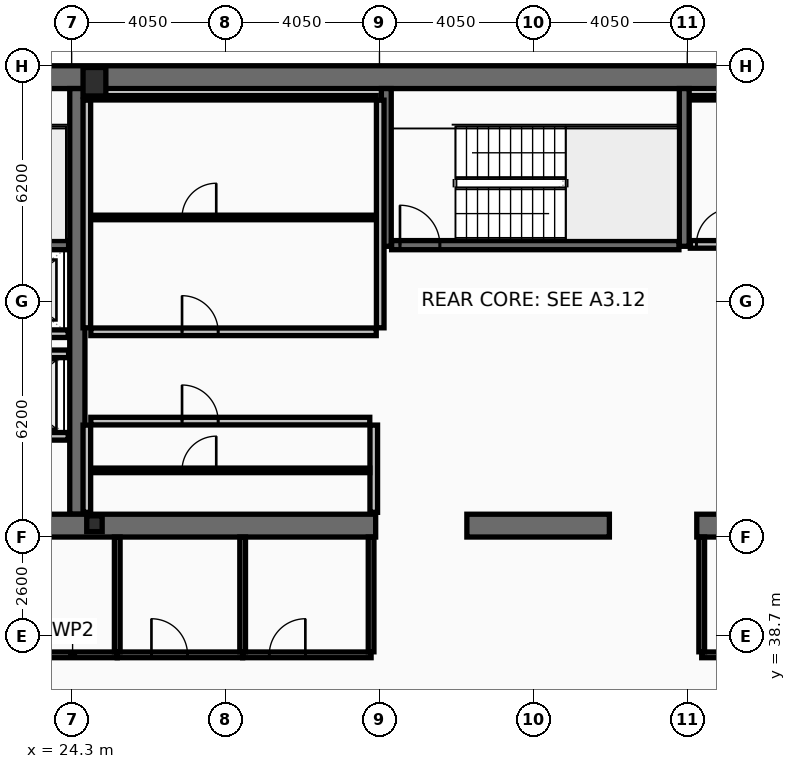
"""IFC4 building model, lengths in metres.
Left out: names, types, materials, properties, quantities, classifications, styles, units other than length and angle.
Written with IfcOpenShell. Run it as: python <this file> out.ifc"""

import sys

from ifc_helpers import new_model, si_unit, direction, frame, frame_2d, origin, origin_2d, place, context, subcontext, project, spatial, rectangle, hollow_rectangle, i_section, extrude, element, fill, save


model = new_model("IFC4")
c1 = context("Model", 3, precision=1e-05, world=origin(), true_north=direction((0.0, 1.0)))
c2 = subcontext(c1, "Body", "Model", "MODEL_VIEW")
j1 = project(units=[si_unit("LENGTHUNIT", "METRE"), si_unit("PLANEANGLEUNIT", "RADIAN")], contexts=[c1])
p1 = place(None, origin())
s1 = spatial("IfcSite", under=j1, at=p1, CompositionType="ELEMENT")
p2 = place(p1, origin())
s2 = spatial("IfcBuilding", under=s1, at=p2, CompositionType="ELEMENT")
p3 = place(p2, frame((0.0, 0.0, 246.2)))
s3 = spatial("IfcBuildingStorey", under=s2, at=p3, CompositionType="ELEMENT", Elevation=246.2)
p4 = place(p3, frame((16.2, 53.4, 0.0), z_axis=(0.0, 0.0, 1.0), x_axis=(1.0, 0.0, 0.0)))
e1 = element("IfcWall", 1, at=p4, inside=s3, PredefinedType="SHEAR", context=c2, shape_type="SweptSolid", body=[
    extrude(rectangle(XDim=40.5, YDim=0.6, at=frame_2d((20.25, 0.0))), origin(), (0.0, 0.0, 1.0), 3.44),
])
p5 = place(p3, frame((24.45, 41.9, 0.0), z_axis=(0.0, 0.0, 1.0), x_axis=(0.0, 1.0, 0.0)))
e2 = element("IfcWall", 2, at=p5, inside=s3, PredefinedType="SHEAR", context=c2, shape_type="SweptSolid", body=[
    extrude(rectangle(XDim=11.2, YDim=0.4, at=frame_2d((5.6, 0.0))), origin(), (0.0, 0.0, 1.0), 3.44),
])
p6 = place(p3, frame((32.3, 41.6, 0.0), z_axis=(0.0, 0.0, 1.0), x_axis=(-1.0, 0.0, 0.0)))
e3 = element("IfcWall", 3, at=p6, inside=s3, PredefinedType="SHEAR", context=c2, shape_type="SweptSolid", body=[
    extrude(rectangle(XDim=11.45, YDim=0.6, at=frame_2d((5.725, 0.0))), origin(), (0.0, 0.0, 1.0), 3.44),
])
p7 = place(p3, frame((38.45, 41.6, 0.0), z_axis=(0.0, 0.0, 1.0), x_axis=(-1.0, 0.0, 0.0)))
e4 = element("IfcWall", 4, at=p7, inside=s3, PredefinedType="SHEAR", context=c2, shape_type="SweptSolid", body=[
    extrude(rectangle(XDim=3.75, YDim=0.6, at=frame_2d((1.875, 0.0))), origin(), (0.0, 0.0, 1.0), 3.44),
])
p8 = place(p3, frame((52.05, 41.6, 0.0), z_axis=(0.0, 0.0, 1.0), x_axis=(-1.0, 0.0, 0.0)))
e5 = element("IfcWall", 5, at=p8, inside=s3, PredefinedType="SHEAR", context=c2, shape_type="SweptSolid", body=[
    extrude(rectangle(XDim=11.3, YDim=0.6, at=frame_2d((5.65, 0.0))), origin(), (0.0, 0.0, 1.0), 3.44),
])
for number, where, z_axis, x_axis in (
    (6, (32.58, 48.95, 0.0), (0.0, 0.0, 1.0), (0.0, 1.0, 0.0)),
    (7, (40.42, 48.95, 0.0), (0.0, 0.0, 1.0), (0.0, 1.0, 0.0)),
):
    element("IfcWall", number, at=place(p3, frame(where, z_axis=z_axis, x_axis=x_axis)), inside=s3, PredefinedType="SHEAR", context=c2, shape_type="SweptSolid", body=[
        extrude(rectangle(XDim=4.15, YDim=0.26, at=frame_2d((2.075, 0.0))), origin(), (0.0, 0.0, 1.0), 3.44),
    ])
p9 = place(p3, frame((16.8, 48.98, 0.0), z_axis=(0.0, 0.0, 1.0), x_axis=(1.0, 0.0, 0.0)))
e8 = element("IfcWall", 8, at=p9, inside=s3, PredefinedType="SHEAR", context=c2, shape_type="SweptSolid", body=[
    extrude(rectangle(XDim=7.42, YDim=0.24, at=frame_2d((3.71, 0.0))), origin(), (0.0, 0.0, 1.0), 3.44),
])
p10 = place(p9, frame((0.22, 0.0, 0.0)))
e9 = element("IfcOpeningElement", 9, at=p10, cuts=e8, PredefinedType="OPENING", context=c2, shape_type="SweptSolid", body=[
    extrude(rectangle(XDim=1.05, YDim=2.15, at=frame_2d((0.525, 1.075))), frame((0.0, 0.13, 0.0), z_axis=(0.0, -1.0, 0.0), x_axis=(1.0, 0.0, 0.0)), (0.0, 0.0, 1.0), 0.26),
])
p11 = place(p3, frame((32.72, 48.98, 0.0), z_axis=(0.0, 0.0, 1.0), x_axis=(1.0, 0.0, 0.0)))
e10 = element("IfcWall", 10, at=p11, inside=s3, PredefinedType="SHEAR", context=c2, shape_type="SweptSolid", body=[
    extrude(rectangle(XDim=7.56, YDim=0.24, at=frame_2d((3.78, 0.0))), origin(), (0.0, 0.0, 1.0), 3.44),
])
p12 = place(p11, frame((0.22, 0.0, 0.0)))
e11 = element("IfcOpeningElement", 11, at=p12, cuts=e10, PredefinedType="OPENING", context=c2, shape_type="SweptSolid", body=[
    extrude(rectangle(XDim=1.05, YDim=2.15, at=frame_2d((0.525, 1.075))), frame((0.0, 0.13, 0.0), z_axis=(0.0, -1.0, 0.0), x_axis=(1.0, 0.0, 0.0)), (0.0, 0.0, 1.0), 0.26),
])
p13 = place(p3, frame((24.9, 53.28, 0.0), z_axis=(0.0, 0.0, 1.0), x_axis=(1.0, 0.0, 0.0)))
e12 = element("IfcColumn", 12, at=p13, inside=s3, PredefinedType="COLUMN", context=c2, shape_type="SweptSolid", body=[
    extrude(hollow_rectangle(XDim=0.6, YDim=0.75, WallThickness=0.045, at=origin_2d()), origin(), (0.0, 0.0, 1.0), 3.6),
])
p14 = place(p3, frame((24.9, 41.65, 0.0), z_axis=(0.0, 0.0, 1.0), x_axis=(1.0, 0.0, 0.0)))
e13 = element("IfcColumn", 13, at=p14, inside=s3, PredefinedType="COLUMN", context=c2, shape_type="SweptSolid", body=[
    extrude(i_section(OverallWidth=0.406, OverallDepth=0.416, WebThickness=0.03, FlangeThickness=0.048, at=origin_2d()), origin(), (0.0, 0.0, 1.0), 3.6),
])
p15 = place(p3, frame((24.21, 43.95, 0.0), z_axis=(0.0, 0.0, 1.0), x_axis=(-1.0, 0.0, 0.0)))
e14 = element("IfcWall", 14, at=p15, inside=s3, PredefinedType="PARTITIONING", context=c2, shape_type="SweptSolid", body=[
    extrude(rectangle(XDim=2.97, YDim=0.2, at=frame_2d((1.485, 0.0))), origin(), (0.0, 0.0, 1.0), 3.44),
])
p16 = place(p15, frame((0.86, 0.0, 0.0)))
e15 = element("IfcOpeningElement", 15, at=p16, cuts=e14, PredefinedType="OPENING", context=c2, shape_type="SweptSolid", body=[
    extrude(rectangle(XDim=1.3, YDim=2.18, at=frame_2d((0.65, 1.09))), frame((0.0, 0.11, 0.0), z_axis=(0.0, -1.0, 0.0), x_axis=(1.0, 0.0, 0.0)), (0.0, 0.0, 1.0), 0.22),
])
p17 = place(p3, frame((24.21, 46.65, 0.0), z_axis=(0.0, 0.0, 1.0), x_axis=(-1.0, 0.0, 0.0)))
e16 = element("IfcWall", 16, at=p17, inside=s3, PredefinedType="PARTITIONING", context=c2, shape_type="SweptSolid", body=[
    extrude(rectangle(XDim=2.97, YDim=0.2, at=frame_2d((1.485, 0.0))), origin(), (0.0, 0.0, 1.0), 3.44),
])
p18 = place(p17, frame((0.91, 0.0, 0.0)))
e17 = element("IfcOpeningElement", 17, at=p18, cuts=e16, PredefinedType="OPENING", context=c2, shape_type="SweptSolid", body=[
    extrude(rectangle(XDim=1.2, YDim=2.18, at=frame_2d((0.6, 1.09))), frame((0.0, 0.11, 0.0), z_axis=(0.0, -1.0, 0.0), x_axis=(1.0, 0.0, 0.0)), (0.0, 0.0, 1.0), 0.22),
])
p19 = place(p3, frame((21.2, 46.12, 0.0), z_axis=(0.0, 0.0, 1.0), x_axis=(1.0, 0.0, 0.0)))
e18 = element("IfcWall", 18, at=p19, inside=s3, PredefinedType="PARTITIONING", context=c2, shape_type="SweptSolid", body=[
    extrude(rectangle(XDim=3.02, YDim=0.2, at=frame_2d((1.51, 0.0))), origin(), (0.0, 0.0, 1.0), 3.44),
])
for number, where, z_axis, x_axis in (
    (19, (24.7, 46.805, 0.0), (0.0, 0.0, 1.0), (0.0, 1.0, 0.0)),
    (20, (32.42, 46.805, 0.0), (0.0, 0.0, 1.0), (0.0, 1.0, 0.0)),
):
    element("IfcWall", number, at=place(p3, frame(where, z_axis=z_axis, x_axis=x_axis)), inside=s3, PredefinedType="PARTITIONING", context=c2, shape_type="SweptSolid", body=[
        extrude(rectangle(XDim=5.99, YDim=0.2, at=frame_2d((2.995, 0.0))), origin(), (0.0, 0.0, 1.0), 3.44),
    ])
p20 = place(p3, frame((24.805, 52.86, 0.0), z_axis=(0.0, 0.0, 1.0), x_axis=(1.0, 0.0, 0.0)))
e21 = element("IfcWall", 21, at=p20, inside=s3, PredefinedType="PARTITIONING", context=c2, shape_type="SweptSolid", body=[
    extrude(rectangle(XDim=7.51, YDim=0.12, at=frame_2d((3.755, 0.0))), origin(), (0.0, 0.0, 1.0), 3.44),
])
p21 = place(p3, frame((24.805, 49.709, 0.0), z_axis=(0.0, 0.0, 1.0), x_axis=(1.0, 0.0, 0.0)))
e22 = element("IfcWall", 22, at=p21, inside=s3, PredefinedType="PARTITIONING", context=c2, shape_type="SweptSolid", body=[
    extrude(rectangle(XDim=7.51, YDim=0.12, at=frame_2d((3.755, 0.0))), origin(), (0.0, 0.0, 1.0), 3.44),
])
p22 = place(p21, frame((2.4, 0.0, 0.0)))
e23 = element("IfcOpeningElement", 23, at=p22, cuts=e22, PredefinedType="OPENING", context=c2, shape_type="SweptSolid", body=[
    extrude(rectangle(XDim=0.9, YDim=2.05, at=frame_2d((0.45, 1.025))), frame((0.0, 0.07, 0.0), z_axis=(0.0, -1.0, 0.0), x_axis=(1.0, 0.0, 0.0)), (0.0, 0.0, 1.0), 0.14),
])
p23 = place(p3, frame((24.805, 46.7, 0.0), z_axis=(0.0, 0.0, 1.0), x_axis=(1.0, 0.0, 0.0)))
e24 = element("IfcWall", 24, at=p23, inside=s3, PredefinedType="PARTITIONING", context=c2, shape_type="SweptSolid", body=[
    extrude(rectangle(XDim=7.51, YDim=0.2, at=frame_2d((3.755, 0.0))), origin(), (0.0, 0.0, 1.0), 3.44),
])
p24 = place(p23, frame((2.4, 0.0, 0.0)))
e25 = element("IfcOpeningElement", 25, at=p24, cuts=e24, PredefinedType="OPENING", context=c2, shape_type="SweptSolid", body=[
    extrude(rectangle(XDim=0.95, YDim=2.1, at=frame_2d((0.475, 1.05))), frame((0.0, 0.11, 0.0), z_axis=(0.0, -1.0, 0.0), x_axis=(1.0, 0.0, 0.0)), (0.0, 0.0, 1.0), 0.22),
])
for number, where, z_axis, x_axis in (
    (26, (24.7, 41.95, 0.0), (0.0, 0.0, 1.0), (0.0, 1.0, 0.0)),
    (27, (32.25, 41.95, 0.0), (0.0, 0.0, 1.0), (0.0, 1.0, 0.0)),
):
    element("IfcWall", number, at=place(p3, frame(where, z_axis=z_axis, x_axis=x_axis)), inside=s3, PredefinedType="PARTITIONING", context=c2, shape_type="SweptSolid", body=[
        extrude(rectangle(XDim=2.295, YDim=0.2, at=frame_2d((1.147, 0.0))), origin(), (0.0, 0.0, 1.0), 3.44),
    ])
p25 = place(p3, frame((24.805, 43.054, 0.0), z_axis=(0.0, 0.0, 1.0), x_axis=(1.0, 0.0, 0.0)))
e28 = element("IfcWall", 28, at=p25, inside=s3, PredefinedType="PARTITIONING", context=c2, shape_type="SweptSolid", body=[
    extrude(rectangle(XDim=7.34, YDim=0.12, at=frame_2d((3.67, 0.0))), origin(), (0.0, 0.0, 1.0), 3.44),
])
p26 = place(p25, frame((2.4, 0.0, 0.0)))
e29 = element("IfcOpeningElement", 29, at=p26, cuts=e28, PredefinedType="OPENING", context=c2, shape_type="SweptSolid", body=[
    extrude(rectangle(XDim=0.9, YDim=2.05, at=frame_2d((0.45, 1.025))), frame((0.0, 0.07, 0.0), z_axis=(0.0, -1.0, 0.0), x_axis=(1.0, 0.0, 0.0)), (0.0, 0.0, 1.0), 0.14),
])
p27 = place(p3, frame((24.805, 44.35, 0.0), z_axis=(0.0, 0.0, 1.0), x_axis=(1.0, 0.0, 0.0)))
e30 = element("IfcWall", 30, at=p27, inside=s3, PredefinedType="PARTITIONING", context=c2, shape_type="SweptSolid", body=[
    extrude(rectangle(XDim=7.34, YDim=0.2, at=frame_2d((3.67, 0.0))), origin(), (0.0, 0.0, 1.0), 3.44),
])
p28 = place(p27, frame((2.4, 0.0, 0.0)))
e31 = element("IfcOpeningElement", 31, at=p28, cuts=e30, PredefinedType="OPENING", context=c2, shape_type="SweptSolid", body=[
    extrude(rectangle(XDim=0.95, YDim=2.1, at=frame_2d((0.475, 1.05))), frame((0.0, 0.11, 0.0), z_axis=(0.0, -1.0, 0.0), x_axis=(1.0, 0.0, 0.0)), (0.0, 0.0, 1.0), 0.22),
])
p29 = place(p3, frame((40.58, 52.86, 0.0), z_axis=(0.0, 0.0, 1.0), x_axis=(1.0, 0.0, 0.0)))
e32 = element("IfcWall", 32, at=p29, inside=s3, PredefinedType="PARTITIONING", context=c2, shape_type="SweptSolid", body=[
    extrude(rectangle(XDim=7.56, YDim=0.12, at=frame_2d((3.78, 0.0))), origin(), (0.0, 0.0, 1.0), 3.44),
])
p30 = place(p3, frame((40.58, 49.0, 0.0), z_axis=(0.0, 0.0, 1.0), x_axis=(1.0, 0.0, 0.0)))
e33 = element("IfcWall", 33, at=p30, inside=s3, PredefinedType="PARTITIONING", context=c2, shape_type="SweptSolid", body=[
    extrude(rectangle(XDim=7.56, YDim=0.2, at=frame_2d((3.78, 0.0))), origin(), (0.0, 0.0, 1.0), 3.44),
])
p31 = place(p30, frame((0.16, 0.0, 0.0)))
e34 = element("IfcOpeningElement", 34, at=p31, cuts=e33, PredefinedType="OPENING", context=c2, shape_type="SweptSolid", body=[
    extrude(rectangle(XDim=0.95, YDim=2.1, at=frame_2d((0.475, 1.05))), frame((0.0, 0.11, 0.0), z_axis=(0.0, -1.0, 0.0), x_axis=(1.0, 0.0, 0.0)), (0.0, 0.0, 1.0), 0.22),
])
p32 = place(p3, frame((20.95, 38.2, 0.0), z_axis=(0.0, 0.0, 1.0), x_axis=(1.0, 0.0, 0.0)))
e35 = element("IfcWall", 35, at=p32, inside=s3, PredefinedType="PARTITIONING", context=c2, shape_type="SweptSolid", body=[
    extrude(rectangle(XDim=4.55, YDim=0.15, at=frame_2d((2.275, 0.0))), origin(), (0.0, 0.0, 1.0), 2.78),
])
p33 = place(p32, frame((0.9, 0.0, 0.0)))
e36 = element("IfcOpeningElement", 36, at=p33, cuts=e35, PredefinedType="OPENING", context=c2, shape_type="SweptSolid", body=[
    extrude(rectangle(XDim=0.95, YDim=2.05, at=frame_2d((0.475, 1.025))), frame((0.0, 0.085, 0.0), z_axis=(0.0, -1.0, 0.0), x_axis=(1.0, 0.0, 0.0)), (0.0, 0.0, 1.0), 0.17),
])
p34 = place(p3, frame((25.5, 38.2, 0.0), z_axis=(0.0, 0.0, 1.0), x_axis=(1.0, 0.0, 0.0)))
e37 = element("IfcWall", 37, at=p34, inside=s3, PredefinedType="PARTITIONING", context=c2, shape_type="SweptSolid", body=[
    extrude(rectangle(XDim=3.3, YDim=0.15, at=frame_2d((1.65, 0.0))), origin(), (0.0, 0.0, 1.0), 3.44),
])
p35 = place(p34, frame((0.9, 0.0, 0.0)))
e38 = element("IfcOpeningElement", 38, at=p35, cuts=e37, PredefinedType="OPENING", context=c2, shape_type="SweptSolid", body=[
    extrude(rectangle(XDim=0.95, YDim=2.05, at=frame_2d((0.475, 1.025))), frame((0.0, 0.085, 0.0), z_axis=(0.0, -1.0, 0.0), x_axis=(1.0, 0.0, 0.0)), (0.0, 0.0, 1.0), 0.17),
])
p36 = place(p3, frame((28.8, 38.2, 0.0), z_axis=(0.0, 0.0, 1.0), x_axis=(1.0, 0.0, 0.0)))
e39 = element("IfcWall", 39, at=p36, inside=s3, PredefinedType="PARTITIONING", context=c2, shape_type="SweptSolid", body=[
    extrude(rectangle(XDim=3.38, YDim=0.15, at=frame_2d((1.69, 0.0))), origin(), (0.0, 0.0, 1.0), 2.78),
])
p37 = place(p36, frame((0.7, 0.0, 0.0)))
e40 = element("IfcOpeningElement", 40, at=p37, cuts=e39, PredefinedType="OPENING", context=c2, shape_type="SweptSolid", body=[
    extrude(rectangle(XDim=0.95, YDim=2.05, at=frame_2d((0.475, 1.025))), frame((0.0, 0.085, 0.0), z_axis=(0.0, -1.0, 0.0), x_axis=(1.0, 0.0, 0.0)), (0.0, 0.0, 1.0), 0.17),
])
for number, where, z_axis, x_axis in (
    (41, (25.5, 38.28, 0.0), (0.0, 0.0, 1.0), (0.0, 1.0, 0.0)),
    (42, (28.8, 38.28, 0.0), (0.0, 0.0, 1.0), (0.0, 1.0, 0.0)),
    (43, (32.18, 38.28, 0.0), (0.0, 0.0, 1.0), (0.0, 1.0, 0.0)),
):
    element("IfcWall", number, at=place(p3, frame(where, z_axis=z_axis, x_axis=x_axis)), inside=s3, PredefinedType="PARTITIONING", context=c2, shape_type="SweptSolid", body=[
        extrude(rectangle(XDim=3.02, YDim=0.15, at=frame_2d((1.51, 0.0))), origin(), (0.0, 0.0, 1.0), 3.44),
    ])
p38 = place(p3, frame((40.88, 38.2, 0.0), z_axis=(0.0, 0.0, 1.0), x_axis=(1.0, 0.0, 0.0)))
e44 = element("IfcWall", 44, at=p38, inside=s3, PredefinedType="PARTITIONING", context=c2, shape_type="SweptSolid", body=[
    extrude(rectangle(XDim=5.42, YDim=0.15, at=frame_2d((2.71, 0.0))), origin(), (0.0, 0.0, 1.0), 2.78),
])
p39 = place(p38, frame((1.1, 0.0, 0.0)))
e45 = element("IfcOpeningElement", 45, at=p39, cuts=e44, PredefinedType="OPENING", context=c2, shape_type="SweptSolid", body=[
    extrude(rectangle(XDim=0.9, YDim=2.05, at=frame_2d((0.45, 1.025))), frame((0.0, 0.085, 0.0), z_axis=(0.0, -1.0, 0.0), x_axis=(1.0, 0.0, 0.0)), (0.0, 0.0, 1.0), 0.17),
])
p40 = place(p3, frame((40.88, 38.28, 0.0), z_axis=(0.0, 0.0, 1.0), x_axis=(0.0, 1.0, 0.0)))
e46 = element("IfcWall", 46, at=p40, inside=s3, PredefinedType="PARTITIONING", context=c2, shape_type="SweptSolid", body=[
    extrude(rectangle(XDim=3.02, YDim=0.15, at=frame_2d((1.51, 0.0))), origin(), (0.0, 0.0, 1.0), 3.44),
])
p41 = place(p12, origin())
e47 = element("IfcDoor", 47, at=p41, inside=s3, OperationType="SINGLE_SWING_LEFT", PredefinedType="DOOR", context=c2, shape_type="SweptSolid", body=[
    extrude(rectangle(XDim=1.05, YDim=2.15, at=frame_2d((0.525, 1.075))), frame((0.0, 0.025, 0.0), z_axis=(0.0, -1.0, 0.0), x_axis=(1.0, 0.0, 0.0)), (0.0, 0.0, 1.0), 0.05),
])
fill(e11, e47)
p42 = place(p22, origin())
e48 = element("IfcDoor", 48, at=p42, inside=s3, OperationType="SINGLE_SWING_RIGHT", PredefinedType="DOOR", context=c2, shape_type="SweptSolid", body=[
    extrude(rectangle(XDim=0.9, YDim=2.05, at=frame_2d((0.45, 1.025))), frame((0.0, 0.025, 0.0), z_axis=(0.0, -1.0, 0.0), x_axis=(1.0, 0.0, 0.0)), (0.0, 0.0, 1.0), 0.05),
])
fill(e23, e48)
p43 = place(p24, origin())
e49 = element("IfcDoor", 49, at=p43, inside=s3, OperationType="SINGLE_SWING_LEFT", PredefinedType="DOOR", context=c2, shape_type="SweptSolid", body=[
    extrude(rectangle(XDim=0.95, YDim=2.1, at=frame_2d((0.475, 1.05))), frame((0.0, 0.025, 0.0), z_axis=(0.0, -1.0, 0.0), x_axis=(1.0, 0.0, 0.0)), (0.0, 0.0, 1.0), 0.05),
])
fill(e25, e49)
p44 = place(p26, origin())
e50 = element("IfcDoor", 50, at=p44, inside=s3, OperationType="SINGLE_SWING_RIGHT", PredefinedType="DOOR", context=c2, shape_type="SweptSolid", body=[
    extrude(rectangle(XDim=0.9, YDim=2.05, at=frame_2d((0.45, 1.025))), frame((0.0, 0.025, 0.0), z_axis=(0.0, -1.0, 0.0), x_axis=(1.0, 0.0, 0.0)), (0.0, 0.0, 1.0), 0.05),
])
fill(e29, e50)
p45 = place(p28, origin())
e51 = element("IfcDoor", 51, at=p45, inside=s3, OperationType="SINGLE_SWING_LEFT", PredefinedType="DOOR", context=c2, shape_type="SweptSolid", body=[
    extrude(rectangle(XDim=0.95, YDim=2.1, at=frame_2d((0.475, 1.05))), frame((0.0, 0.025, 0.0), z_axis=(0.0, -1.0, 0.0), x_axis=(1.0, 0.0, 0.0)), (0.0, 0.0, 1.0), 0.05),
])
fill(e31, e51)
p46 = place(p31, origin())
e52 = element("IfcDoor", 52, at=p46, inside=s3, OperationType="SINGLE_SWING_RIGHT", PredefinedType="DOOR", context=c2, shape_type="SweptSolid", body=[
    extrude(rectangle(XDim=0.95, YDim=2.1, at=frame_2d((0.475, 1.05))), frame((0.0, 0.025, 0.0), z_axis=(0.0, -1.0, 0.0), x_axis=(1.0, 0.0, 0.0)), (0.0, 0.0, 1.0), 0.05),
])
fill(e34, e52)
p47 = place(p35, origin())
e53 = element("IfcDoor", 53, at=p47, inside=s3, OperationType="SINGLE_SWING_LEFT", PredefinedType="DOOR", context=c2, shape_type="SweptSolid", body=[
    extrude(rectangle(XDim=0.95, YDim=2.05, at=frame_2d((0.475, 1.025))), frame((0.0, 0.025, 0.0), z_axis=(0.0, -1.0, 0.0), x_axis=(1.0, 0.0, 0.0)), (0.0, 0.0, 1.0), 0.05),
])
fill(e38, e53)
p48 = place(p37, origin())
e54 = element("IfcDoor", 54, at=p48, inside=s3, OperationType="SINGLE_SWING_RIGHT", PredefinedType="DOOR", context=c2, shape_type="SweptSolid", body=[
    extrude(rectangle(XDim=0.95, YDim=2.05, at=frame_2d((0.475, 1.025))), frame((0.0, 0.025, 0.0), z_axis=(0.0, -1.0, 0.0), x_axis=(1.0, 0.0, 0.0)), (0.0, 0.0, 1.0), 0.05),
])
fill(e40, e54)
save(model, sys.argv[1])
